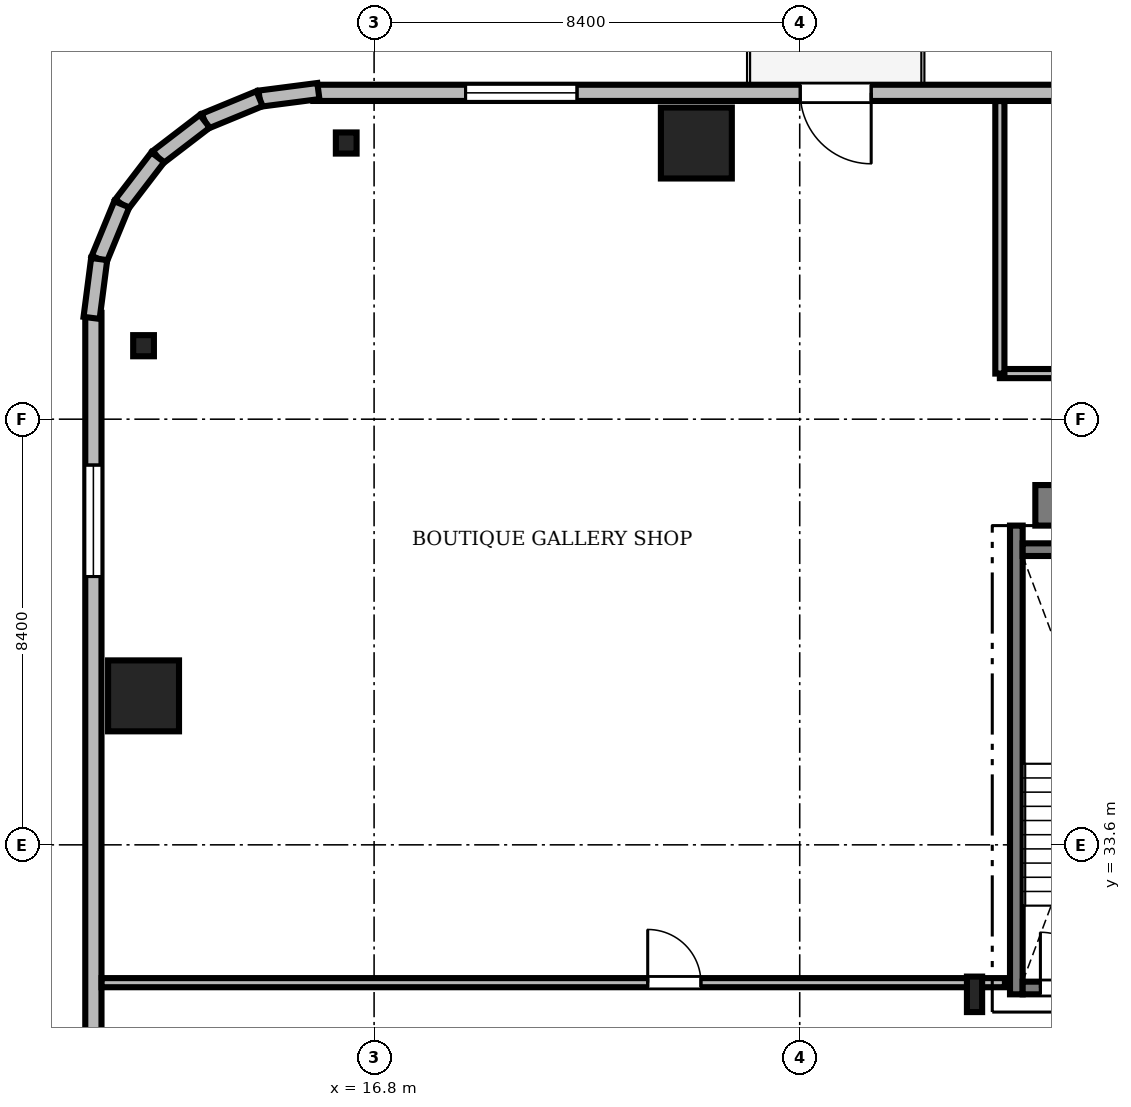
"""IFC4 building model, lengths in metres.
Left out: names, types, materials, properties, quantities, classifications, styles, units other than length and angle.
Written with IfcOpenShell. Run it as: python <this file> out.ifc"""

import sys

from ifc_helpers import new_model, si_unit, direction, frame, frame_2d, origin, origin_2d, place, context, subcontext, project, spatial, rectangle, i_section, extrude, source, transform, mapped, element, fill, save


model = new_model("IFC4")
c1 = context("Model", 3, precision=1e-05, world=origin(), true_north=direction((0.0, 1.0)))
c2 = subcontext(c1, "Body", "Model", "MODEL_VIEW")
j1 = project(units=[si_unit("LENGTHUNIT", "METRE"), si_unit("PLANEANGLEUNIT", "RADIAN")], contexts=[c1])
p1 = place(None, origin())
s1 = spatial("IfcSite", under=j1, at=p1, CompositionType="ELEMENT")
p2 = place(p1, origin())
s2 = spatial("IfcBuilding", under=s1, at=p2, CompositionType="ELEMENT")
p3 = place(p2, frame((0.0, 0.0, 199.8)))
s3 = spatial("IfcBuildingStorey", under=s2, at=p3, CompositionType="ELEMENT", Elevation=199.8)
m1 = source(origin(), c2, "Body", "SweptSolid", [
    extrude(rectangle(XDim=17.52, YDim=0.8, at=frame_2d((8.76, 0.0))), origin(), (0.0, 0.0, 1.0), 3.53),
])
p4 = place(p3, frame((29.85, 40.3, 0.0), z_axis=(0.0, 0.0, 1.0), x_axis=(1.0, 0.0, 0.0)))
e1 = element("IfcWall", 1, at=p4, inside=s3, PredefinedType="SHEAR", context=c2, shape_type="MappedRepresentation", body=[
    mapped(m1, transform((0.0, 0.0, 0.0), scale=1.0)),
])
m2 = source(origin(), c2, "Body", "SweptSolid", [
    extrude(i_section(OverallWidth=0.3, OverallDepth=0.7, WebThickness=0.017, FlangeThickness=0.032, FilletRadius=0.027, at=origin_2d()), origin(), (0.0, 0.0, 1.0), 3.53),
])
p5 = place(p3, frame((28.65, 30.65, 0.0), z_axis=(0.0, 0.0, 1.0), x_axis=(1.0, 0.0, 0.0)))
e2 = element("IfcColumn", 2, at=p5, inside=s3, PredefinedType="COLUMN", context=c2, shape_type="MappedRepresentation", body=[
    mapped(m2, transform((0.0, 0.0, 0.0), scale=1.0)),
])
m3 = source(origin(), c2, "Body", "SweptSolid", [
    extrude(rectangle(XDim=1.4, YDim=1.4, at=origin_2d()), origin(), (0.0, 0.0, 1.0), 3.53),
])
for number, where, z_axis, x_axis in (
    (3, (23.16, 47.45, 0.0), (0.0, 0.0, 1.0), (1.0, 0.0, 0.0)),
    (4, (12.25, 36.54, 0.0), (0.0, 0.0, 1.0), (1.0, 0.0, 0.0)),
):
    element("IfcColumn", number, at=place(p3, frame(where, z_axis=z_axis, x_axis=x_axis)), inside=s3, PredefinedType="COLUMN", context=c2, shape_type="MappedRepresentation", body=[
        mapped(m3, transform((0.0, 0.0, 0.0), scale=1.0)),
    ])
m4 = source(origin(), c2, "Body", "SweptSolid", [
    extrude(i_section(OverallWidth=0.409, OverallDepth=0.417, WebThickness=0.021, FlangeThickness=0.033, FilletRadius=0.015, at=origin_2d()), origin(), (0.0, 0.0, 1.0), 3.53),
])
for number, where, z_axis, x_axis in (
    (5, (16.25, 47.45, 0.0), (0.0, 0.0, 1.0), (1.0, 0.0, 0.0)),
    (6, (12.25, 43.45, 0.0), (0.0, 0.0, 1.0), (1.0, 0.0, 0.0)),
):
    element("IfcColumn", number, at=place(p3, frame(where, z_axis=z_axis, x_axis=x_axis)), inside=s3, PredefinedType="COLUMN", context=c2, shape_type="MappedRepresentation", body=[
        mapped(m4, transform((0.0, 0.0, 0.0), scale=1.0)),
    ])
m5 = source(origin(), c2, "Body", "SweptSolid", [
    extrude(rectangle(XDim=15.6, YDim=0.32, at=frame_2d((7.8, 0.0))), origin(), (0.0, 0.0, 1.0), 3.53),
])
p6 = place(p3, frame((31.2, 48.44, 0.0), z_axis=(0.0, 0.0, 1.0), x_axis=(-1.0, 0.0, 0.0)))
e7 = element("IfcWall", 7, at=p6, inside=s3, PredefinedType="SOLIDWALL", context=c2, shape_type="MappedRepresentation", body=[
    mapped(m5, transform((0.0, 0.0, 0.0), scale=1.0)),
])
m6 = source(origin(), c2, "Body", "SweptSolid", [
    extrude(rectangle(XDim=1.4, YDim=2.3, at=frame_2d((0.7, 1.15))), frame((0.0, 0.17, 0.0), z_axis=(0.0, -1.0, 0.0), x_axis=(1.0, 0.0, 0.0)), (0.0, 0.0, 1.0), 0.34),
])
p7 = place(p6, frame((4.59, 0.0, 0.0)))
e8 = element("IfcOpeningElement", 8, at=p7, cuts=e7, PredefinedType="OPENING", context=c2, shape_type="MappedRepresentation", body=[
    mapped(m6, transform((0.0, 0.0, 0.0), scale=1.0)),
])
m7 = source(origin(), c2, "Body", "SweptSolid", [
    extrude(rectangle(XDim=2.2, YDim=2.4, at=frame_2d((1.1, 1.2))), frame((0.0, 0.17, 0.0), z_axis=(0.0, -1.0, 0.0), x_axis=(1.0, 0.0, 0.0)), (0.0, 0.0, 1.0), 0.34),
])
p8 = place(p6, frame((10.395, 0.0, 0.72)))
e9 = element("IfcOpeningElement", 9, at=p8, cuts=e7, PredefinedType="OPENING", context=c2, shape_type="MappedRepresentation", body=[
    mapped(m7, transform((0.0, 0.0, 0.0), scale=1.0)),
])
m8 = source(origin(), c2, "Body", "SweptSolid", [
    extrude(rectangle(XDim=15.6, YDim=0.32, at=frame_2d((7.8, 0.0))), origin(), (0.0, 0.0, 1.0), 3.53),
])
p9 = place(p3, frame((11.26, 44.1, 0.0), z_axis=(0.0, 0.0, 1.0), x_axis=(0.0, -1.0, 0.0)))
e10 = element("IfcWall", 10, at=p9, inside=s3, PredefinedType="SOLIDWALL", context=c2, shape_type="MappedRepresentation", body=[
    mapped(m8, transform((0.0, 0.0, 0.0), scale=1.0)),
])
p10 = place(p9, frame((3.005, 0.0, 0.72)))
e11 = element("IfcOpeningElement", 11, at=p10, cuts=e10, PredefinedType="OPENING", context=c2, shape_type="MappedRepresentation", body=[
    mapped(m7, transform((0.0, 0.0, 0.0), scale=1.0)),
])
m9 = source(origin(), c2, "Body", "SweptSolid", [
    extrude(rectangle(XDim=1.17, YDim=0.32, at=frame_2d((0.585, 0.0))), origin(), (0.0, 0.0, 1.0), 3.53),
])
p11 = place(p3, frame((15.7, 48.476, 0.0), z_axis=(0.0, 0.0, 1.0), x_axis=(-0.991735963317, -0.128295670475, 0.0)))
e12 = element("IfcWall", 12, at=p11, inside=s3, PredefinedType="SOLIDWALL", context=c2, shape_type="MappedRepresentation", body=[
    mapped(m9, transform((0.0, 0.0, 0.0), scale=1.0)),
])
m10 = source(origin(), c2, "Body", "SweptSolid", [
    extrude(rectangle(XDim=1.169, YDim=0.32, at=frame_2d((0.584, 0.0))), origin(), (0.0, 0.0, 1.0), 3.53),
])
p12 = place(p3, frame((14.54, 48.325, 0.0), z_axis=(0.0, 0.0, 1.0), x_axis=(-0.924552646638, -0.381054331552, 0.0)))
e13 = element("IfcWall", 13, at=p12, inside=s3, PredefinedType="SOLIDWALL", context=c2, shape_type="MappedRepresentation", body=[
    mapped(m10, transform((0.0, 0.0, 0.0), scale=1.0)),
])
m11 = source(origin(), c2, "Body", "SweptSolid", [
    extrude(rectangle(XDim=1.169, YDim=0.32, at=frame_2d((0.584, 0.0))), origin(), (0.0, 0.0, 1.0), 3.53),
])
p13 = place(p3, frame((13.459, 47.88, 0.0), z_axis=(0.0, 0.0, 1.0), x_axis=(-0.793663520347, -0.608356981114, 0.0)))
e14 = element("IfcWall", 14, at=p13, inside=s3, PredefinedType="SOLIDWALL", context=c2, shape_type="MappedRepresentation", body=[
    mapped(m11, transform((0.0, 0.0, 0.0), scale=1.0)),
])
m12 = source(origin(), c2, "Body", "SweptSolid", [
    extrude(rectangle(XDim=1.169, YDim=0.32, at=frame_2d((0.584, 0.0))), origin(), (0.0, 0.0, 1.0), 3.53),
])
p14 = place(p3, frame((12.531, 47.169, 0.0), z_axis=(0.0, 0.0, 1.0), x_axis=(-0.608387696831, -0.793639975269, 0.0)))
e15 = element("IfcWall", 15, at=p14, inside=s3, PredefinedType="SOLIDWALL", context=c2, shape_type="MappedRepresentation", body=[
    mapped(m12, transform((0.0, 0.0, 0.0), scale=1.0)),
])
p15 = place(p3, frame((11.82, 46.241, 0.0), z_axis=(0.0, 0.0, 1.0), x_axis=(-0.381054331552, -0.924552646638, 0.0)))
e16 = element("IfcWall", 16, at=p15, inside=s3, PredefinedType="SOLIDWALL", context=c2, shape_type="MappedRepresentation", body=[
    mapped(m10, transform((0.0, 0.0, 0.0), scale=1.0)),
])
p16 = place(p3, frame((11.375, 45.16, 0.0), z_axis=(0.0, 0.0, 1.0), x_axis=(-0.128295670475, -0.991735963317, 0.0)))
e17 = element("IfcWall", 17, at=p16, inside=s3, PredefinedType="SOLIDWALL", context=c2, shape_type="MappedRepresentation", body=[
    mapped(m9, transform((0.0, 0.0, 0.0), scale=1.0)),
])
m13 = source(origin(), c2, "Body", "SweptSolid", [
    extrude(rectangle(XDim=9.25, YDim=0.25, at=frame_2d((4.625, 0.0))), origin(), (0.0, 0.0, 1.0), 3.55),
])
p17 = place(p3, frame((29.475, 30.65, 0.0), z_axis=(0.0, 0.0, 1.0), x_axis=(0.0, 1.0, 0.0)))
e18 = element("IfcWall", 18, at=p17, inside=s3, PredefinedType="SOLIDWALL", context=c2, shape_type="MappedRepresentation", body=[
    mapped(m13, transform((0.0, 0.0, 0.0), scale=1.0)),
])
m14 = source(origin(), c2, "Body", "SweptSolid", [
    extrude(rectangle(XDim=3.15, YDim=0.25, at=frame_2d((1.575, 0.0))), origin(), (0.0, 0.0, 1.0), 3.55),
])
p18 = place(p3, frame((29.6, 39.425, 0.0), z_axis=(0.0, 0.0, 1.0), x_axis=(1.0, 0.0, 0.0)))
e19 = element("IfcWall", 19, at=p18, inside=s3, PredefinedType="SOLIDWALL", context=c2, shape_type="MappedRepresentation", body=[
    mapped(m14, transform((0.0, 0.0, 0.0), scale=1.0)),
])
p19 = place(p3, frame((29.6, 30.775, 0.0), z_axis=(0.0, 0.0, 1.0), x_axis=(1.0, 0.0, 0.0)))
e20 = element("IfcWall", 20, at=p19, inside=s3, PredefinedType="SOLIDWALL", context=c2, shape_type="MappedRepresentation", body=[
    mapped(m14, transform((0.0, 0.0, 0.0), scale=1.0)),
])
m15 = source(origin(), c2, "Body", "SweptSolid", [
    extrude(rectangle(XDim=1.1, YDim=2.2, at=frame_2d((0.55, 1.1))), frame((0.0, 0.135, 0.0), z_axis=(0.0, -1.0, 0.0), x_axis=(1.0, 0.0, 0.0)), (0.0, 0.0, 1.0), 0.27),
])
p20 = place(p19, frame((0.35, 0.0, 0.0)))
e21 = element("IfcOpeningElement", 21, at=p20, cuts=e20, PredefinedType="OPENING", context=c2, shape_type="MappedRepresentation", body=[
    mapped(m15, transform((0.0, 0.0, 0.0), scale=1.0)),
])
m16 = source(origin(), c2, "Body", "SweptSolid", [
    extrude(rectangle(XDim=28.428, YDim=0.18, at=frame_2d((14.214, 0.0))), origin(), (0.0, 0.0, 1.0), 2.772),
])
p21 = place(p3, frame((29.15, 42.9, 0.0), z_axis=(0.0, 0.0, 1.0), x_axis=(1.0, 0.0, 0.0)))
e22 = element("IfcWall", 22, at=p21, inside=s3, PredefinedType="PARTITIONING", context=c2, shape_type="MappedRepresentation", body=[
    mapped(m16, transform((0.0, 0.0, 0.0), scale=1.0)),
])
m17 = source(origin(), c2, "Body", "SweptSolid", [
    extrude(rectangle(XDim=1.05, YDim=2.2, at=frame_2d((0.525, 1.1))), frame((0.0, 0.1, 0.0), z_axis=(0.0, -1.0, 0.0), x_axis=(1.0, 0.0, 0.0)), (0.0, 0.0, 1.0), 0.2),
])
p22 = place(p21, frame((4.5, 0.0, 0.0)))
e23 = element("IfcOpeningElement", 23, at=p22, cuts=e22, PredefinedType="OPENING", context=c2, shape_type="MappedRepresentation", body=[
    mapped(m17, transform((0.0, 0.0, 0.0), scale=1.0)),
])
m18 = source(origin(), c2, "Body", "SweptSolid", [
    extrude(rectangle(XDim=17.828, YDim=0.18, at=frame_2d((8.914, 0.0))), origin(), (0.0, 0.0, 1.0), 2.772),
])
p23 = place(p3, frame((11.422, 30.88, 0.0), z_axis=(0.0, 0.0, 1.0), x_axis=(1.0, 0.0, 0.0)))
e24 = element("IfcWall", 24, at=p23, inside=s3, PredefinedType="PARTITIONING", context=c2, shape_type="MappedRepresentation", body=[
    mapped(m18, transform((0.0, 0.0, 0.0), scale=1.0)),
])
p24 = place(p23, frame((10.778, 0.0, 0.0)))
e25 = element("IfcOpeningElement", 25, at=p24, cuts=e24, PredefinedType="OPENING", context=c2, shape_type="MappedRepresentation", body=[
    mapped(m17, transform((0.0, 0.0, 0.0), scale=1.0)),
])
m19 = source(origin(), c2, "Body", "SweptSolid", [
    extrude(rectangle(XDim=5.378, YDim=0.18, at=frame_2d((2.689, 0.0))), origin(), (0.0, 0.0, 1.0), 2.772),
])
p25 = place(p3, frame((29.15, 42.9, 0.0), z_axis=(0.0, 0.0, 1.0), x_axis=(0.0, 1.0, 0.0)))
e26 = element("IfcWall", 26, at=p25, inside=s3, PredefinedType="PARTITIONING", context=c2, shape_type="MappedRepresentation", body=[
    mapped(m19, transform((0.0, 0.0, 0.0), scale=1.0)),
])
m20 = source(origin(), c2, "Body", "SweptSolid", [
    extrude(rectangle(XDim=1.4, YDim=2.3, at=frame_2d((0.7, 1.15))), frame((0.0, 0.025, 0.0), z_axis=(0.0, -1.0, 0.0), x_axis=(1.0, 0.0, 0.0)), (0.0, 0.0, 1.0), 0.05),
])
p26 = place(p7, frame((1.4, 0.0, 0.0), z_axis=(0.0, 0.0, 1.0), x_axis=(-1.0, 0.0, 0.0)))
e27 = element("IfcDoor", 27, at=p26, inside=s3, OperationType="DOUBLE_DOOR_SLIDING", PredefinedType="DOOR", context=c2, shape_type="MappedRepresentation", body=[
    mapped(m20, transform((0.0, 0.0, 0.0), scale=1.0)),
])
fill(e8, e27)
m21 = source(origin(), c2, "Body", "SweptSolid", [
    extrude(rectangle(XDim=2.2, YDim=2.4, at=frame_2d((1.1, 1.2))), frame((0.0, 0.03, 0.0), z_axis=(0.0, -1.0, 0.0), x_axis=(1.0, 0.0, 0.0)), (0.0, 0.0, 1.0), 0.06),
])
p27 = place(p8, origin())
e28 = element("IfcWindow", 28, at=p27, inside=s3, PartitioningType="SINGLE_PANEL", PredefinedType="WINDOW", context=c2, shape_type="MappedRepresentation", body=[
    mapped(m21, transform((0.0, 0.0, 0.0), scale=1.0)),
])
fill(e9, e28)
p28 = place(p10, origin())
e29 = element("IfcWindow", 29, at=p28, inside=s3, PartitioningType="SINGLE_PANEL", PredefinedType="WINDOW", context=c2, shape_type="MappedRepresentation", body=[
    mapped(m21, transform((0.0, 0.0, 0.0), scale=1.0)),
])
fill(e11, e29)
m22 = source(origin(), c2, "Body", "SweptSolid", [
    extrude(rectangle(XDim=1.1, YDim=2.2, at=frame_2d((0.55, 1.1))), frame((0.0, 0.025, 0.0), z_axis=(0.0, -1.0, 0.0), x_axis=(1.0, 0.0, 0.0)), (0.0, 0.0, 1.0), 0.05),
])
p29 = place(p20, origin())
e30 = element("IfcDoor", 30, at=p29, inside=s3, OperationType="SINGLE_SWING_LEFT", PredefinedType="DOOR", context=c2, shape_type="MappedRepresentation", body=[
    mapped(m22, transform((0.0, 0.0, 0.0), scale=1.0)),
])
fill(e21, e30)
m23 = source(origin(), c2, "Body", "SweptSolid", [
    extrude(rectangle(XDim=1.05, YDim=2.2, at=frame_2d((0.525, 1.1))), frame((0.0, 0.025, 0.0), z_axis=(0.0, -1.0, 0.0), x_axis=(1.0, 0.0, 0.0)), (0.0, 0.0, 1.0), 0.05),
])
p30 = place(p24, origin())
e31 = element("IfcDoor", 31, at=p30, inside=s3, OperationType="SINGLE_SWING_LEFT", PredefinedType="DOOR", context=c2, shape_type="MappedRepresentation", body=[
    mapped(m23, transform((0.0, 0.0, 0.0), scale=1.0)),
])
fill(e25, e31)
save(model, sys.argv[1])
